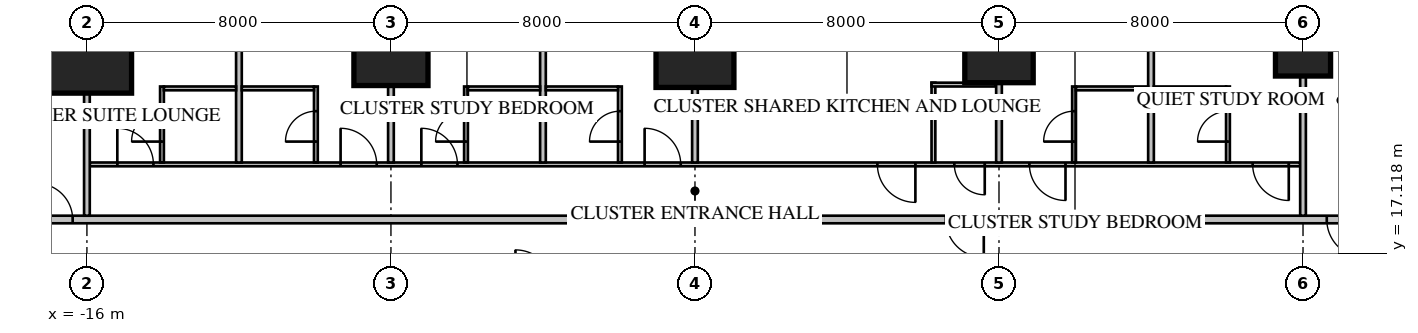
"""IFC4 building model, lengths in metres.
Left out: names, types, materials, properties, quantities, classifications, styles, units other than length and angle.
Written with IfcOpenShell. Run it as: python <this file> out.ifc"""

import sys

from ifc_helpers import new_model, si_unit, direction, frame, frame_2d, origin, origin_2d, place, context, subcontext, project, spatial, rectangle, extrude, element, fill, save


model = new_model("IFC4")
c1 = context("Model", 3, precision=1e-05, world=origin(), true_north=direction((0.0, 1.0)))
c2 = subcontext(c1, "Body", "Model", "MODEL_VIEW")
j1 = project(units=[si_unit("LENGTHUNIT", "METRE"), si_unit("PLANEANGLEUNIT", "RADIAN")], contexts=[c1])
p1 = place(None, origin())
s1 = spatial("IfcSite", under=j1, at=p1, CompositionType="ELEMENT")
p2 = place(p1, origin())
s2 = spatial("IfcBuilding", under=s1, at=p2, CompositionType="ELEMENT")
p3 = place(p2, frame((0.0, 0.0, 39.1)))
s3 = spatial("IfcBuildingStorey", under=s2, at=p3, CompositionType="ELEMENT", Elevation=39.1)
p4 = place(p3, frame((16.0, 22.5, 0.0), z_axis=(0.0, 0.0, 1.0), x_axis=(1.0, 0.0, 0.0)))
e1 = element("IfcColumn", 1, at=p4, inside=s3, PredefinedType="COLUMN", context=c2, shape_type="SweptSolid", body=[
    extrude(rectangle(XDim=1.45, YDim=1.45, at=origin_2d()), origin(), (0.0, 0.0, 1.0), 3.85),
])
p5 = place(p3, frame((8.0, 22.5, 0.0), z_axis=(0.0, 0.0, 1.0), x_axis=(1.0, 0.0, 0.0)))
e2 = element("IfcColumn", 2, at=p5, inside=s3, PredefinedType="COLUMN", context=c2, shape_type="SweptSolid", body=[
    extrude(rectangle(XDim=1.8, YDim=1.8, at=origin_2d()), origin(), (0.0, 0.0, 1.0), 3.85),
])
p6 = place(p3, frame((0.0, 22.5, 0.0), z_axis=(0.0, 0.0, 1.0), x_axis=(1.0, 0.0, 0.0)))
e3 = element("IfcColumn", 3, at=p6, inside=s3, PredefinedType="COLUMN", context=c2, shape_type="SweptSolid", body=[
    extrude(rectangle(XDim=2.05, YDim=2.05, at=origin_2d()), origin(), (0.0, 0.0, 1.0), 3.85),
])
p7 = place(p3, frame((-8.0, 22.5, 0.0), z_axis=(0.0, 0.0, 1.0), x_axis=(1.0, 0.0, 0.0)))
e4 = element("IfcColumn", 4, at=p7, inside=s3, PredefinedType="COLUMN", context=c2, shape_type="SweptSolid", body=[
    extrude(rectangle(XDim=1.95, YDim=1.95, at=origin_2d()), origin(), (0.0, 0.0, 1.0), 3.85),
])
p8 = place(p3, frame((-16.0, 22.5, 0.0), z_axis=(0.0, 0.0, 1.0), x_axis=(1.0, 0.0, 0.0)))
e5 = element("IfcColumn", 5, at=p8, inside=s3, PredefinedType="COLUMN", context=c2, shape_type="SweptSolid", body=[
    extrude(rectangle(XDim=2.35, YDim=2.35, at=origin_2d()), origin(), (0.0, 0.0, 1.0), 3.85),
])
p9 = place(p3, frame((18.0, 18.0, 0.0), z_axis=(0.0, 0.0, 1.0), x_axis=(-1.0, 0.0, 0.0)))
e6 = element("IfcWall", 6, at=p9, inside=s3, PredefinedType="PARTITIONING", context=c2, shape_type="SweptSolid", body=[
    extrude(rectangle(XDim=36.0, YDim=0.2, at=frame_2d((18.0, 0.0))), origin(), (0.0, 0.0, 1.0), 3.65),
])
p10 = place(p9, frame((10.4, 0.0, 0.0)))
e7 = element("IfcOpeningElement", 7, at=p10, cuts=e6, PredefinedType="OPENING", context=c2, shape_type="SweptSolid", body=[
    extrude(rectangle(XDim=1.0, YDim=2.1, at=frame_2d((0.5, 1.05))), frame((0.0, 0.12, 0.0), z_axis=(0.0, -1.0, 0.0), x_axis=(1.0, 0.0, 0.0)), (0.0, 0.0, 1.0), 0.24),
])
p11 = place(p9, frame((0.375, 0.0, 0.0)))
e8 = element("IfcOpeningElement", 8, at=p11, cuts=e6, PredefinedType="OPENING", context=c2, shape_type="SweptSolid", body=[
    extrude(rectangle(XDim=1.0, YDim=2.1, at=frame_2d((0.5, 1.05))), frame((0.0, 0.12, 0.0), z_axis=(0.0, -1.0, 0.0), x_axis=(1.0, 0.0, 0.0)), (0.0, 0.0, 1.0), 0.24),
])
p12 = place(p9, frame((34.375, 0.0, 0.0)))
e9 = element("IfcOpeningElement", 9, at=p12, cuts=e6, PredefinedType="OPENING", context=c2, shape_type="SweptSolid", body=[
    extrude(rectangle(XDim=0.95, YDim=2.1, at=frame_2d((0.475, 1.05))), frame((0.0, 0.12, 0.0), z_axis=(0.0, -1.0, 0.0), x_axis=(1.0, 0.0, 0.0)), (0.0, 0.0, 1.0), 0.24),
])
p13 = place(p3, frame((15.925, 19.45, 0.0), z_axis=(0.0, 0.0, 1.0), x_axis=(-1.0, 0.0, 0.0)))
e10 = element("IfcWall", 10, at=p13, inside=s3, PredefinedType="PARTITIONING", context=c2, shape_type="SweptSolid", body=[
    extrude(rectangle(XDim=31.85, YDim=0.1, at=frame_2d((15.925, 0.0))), origin(), (0.0, 0.0, 1.0), 3.65),
])
p14 = place(p13, frame((10.125, 0.0, 0.0)))
e11 = element("IfcOpeningElement", 11, at=p14, cuts=e10, PredefinedType="OPENING", context=c2, shape_type="SweptSolid", body=[
    extrude(rectangle(XDim=1.0, YDim=2.1, at=frame_2d((0.5, 1.05))), frame((0.0, 0.07, 0.0), z_axis=(0.0, -1.0, 0.0), x_axis=(1.0, 0.0, 0.0)), (0.0, 0.0, 1.0), 0.14),
])
p15 = place(p13, frame((8.3, 0.0, 0.0)))
e12 = element("IfcOpeningElement", 12, at=p15, cuts=e10, PredefinedType="OPENING", context=c2, shape_type="SweptSolid", body=[
    extrude(rectangle(XDim=0.8, YDim=2.1, at=frame_2d((0.4, 1.05))), frame((0.0, 0.07, 0.0), z_axis=(0.0, -1.0, 0.0), x_axis=(1.0, 0.0, 0.0)), (0.0, 0.0, 1.0), 0.14),
])
p16 = place(p13, frame((0.3, 0.0, 0.0)))
e13 = element("IfcOpeningElement", 13, at=p16, cuts=e10, PredefinedType="OPENING", context=c2, shape_type="SweptSolid", body=[
    extrude(rectangle(XDim=0.95, YDim=2.1, at=frame_2d((0.475, 1.05))), frame((0.0, 0.07, 0.0), z_axis=(0.0, -1.0, 0.0), x_axis=(1.0, 0.0, 0.0)), (0.0, 0.0, 1.0), 0.14),
])
p17 = place(p13, frame((6.175, 0.0, 0.0)))
e14 = element("IfcOpeningElement", 14, at=p17, cuts=e10, PredefinedType="OPENING", context=c2, shape_type="SweptSolid", body=[
    extrude(rectangle(XDim=0.95, YDim=2.1, at=frame_2d((0.475, 1.05))), frame((0.0, 0.07, 0.0), z_axis=(0.0, -1.0, 0.0), x_axis=(1.0, 0.0, 0.0)), (0.0, 0.0, 1.0), 0.14),
])
p18 = place(p13, frame((16.3, 0.0, 0.0)))
e15 = element("IfcOpeningElement", 15, at=p18, cuts=e10, PredefinedType="OPENING", context=c2, shape_type="SweptSolid", body=[
    extrude(rectangle(XDim=0.95, YDim=2.1, at=frame_2d((0.475, 1.05))), frame((0.0, 0.07, 0.0), z_axis=(0.0, -1.0, 0.0), x_axis=(1.0, 0.0, 0.0)), (0.0, 0.0, 1.0), 0.14),
])
p19 = place(p13, frame((22.175, 0.0, 0.0)))
e16 = element("IfcOpeningElement", 16, at=p19, cuts=e10, PredefinedType="OPENING", context=c2, shape_type="SweptSolid", body=[
    extrude(rectangle(XDim=0.95, YDim=2.1, at=frame_2d((0.475, 1.05))), frame((0.0, 0.07, 0.0), z_axis=(0.0, -1.0, 0.0), x_axis=(1.0, 0.0, 0.0)), (0.0, 0.0, 1.0), 0.14),
])
p20 = place(p13, frame((24.3, 0.0, 0.0)))
e17 = element("IfcOpeningElement", 17, at=p20, cuts=e10, PredefinedType="OPENING", context=c2, shape_type="SweptSolid", body=[
    extrude(rectangle(XDim=0.95, YDim=2.1, at=frame_2d((0.475, 1.05))), frame((0.0, 0.07, 0.0), z_axis=(0.0, -1.0, 0.0), x_axis=(1.0, 0.0, 0.0)), (0.0, 0.0, 1.0), 0.14),
])
p21 = place(p13, frame((30.175, 0.0, 0.0)))
e18 = element("IfcOpeningElement", 18, at=p21, cuts=e10, PredefinedType="OPENING", context=c2, shape_type="SweptSolid", body=[
    extrude(rectangle(XDim=0.95, YDim=2.1, at=frame_2d((0.475, 1.05))), frame((0.0, 0.07, 0.0), z_axis=(0.0, -1.0, 0.0), x_axis=(1.0, 0.0, 0.0)), (0.0, 0.0, 1.0), 0.14),
])
p22 = place(p3, frame((6.275, 19.5, 0.0), z_axis=(0.0, 0.0, 1.0), x_axis=(0.0, 1.0, 0.0)))
e19 = element("IfcWall", 19, at=p22, inside=s3, PredefinedType="PARTITIONING", context=c2, shape_type="SweptSolid", body=[
    extrude(rectangle(XDim=2.1, YDim=0.1, at=frame_2d((1.05, 0.0))), origin(), (0.0, 0.0, 1.0), 3.65),
])
p23 = place(p3, frame((7.925, 21.55, 0.0), z_axis=(0.0, 0.0, 1.0), x_axis=(-1.0, 0.0, 0.0)))
e20 = element("IfcWall", 20, at=p23, inside=s3, PredefinedType="PARTITIONING", context=c2, shape_type="SweptSolid", body=[
    extrude(rectangle(XDim=1.7, YDim=0.1, at=frame_2d((0.85, 0.0))), origin(), (0.0, 0.0, 1.0), 3.65),
])
p24 = place(p3, frame((16.0, 18.1, 0.0), z_axis=(0.0, 0.0, 1.0), x_axis=(0.0, 1.0, 0.0)))
e21 = element("IfcWall", 21, at=p24, inside=s3, PredefinedType="PARTITIONING", context=c2, shape_type="SweptSolid", body=[
    extrude(rectangle(XDim=6.589, YDim=0.15, at=frame_2d((3.295, 0.0))), origin(), (0.0, 0.0, 1.0), 3.65),
])
for number, where, z_axis, x_axis in (
    (22, (12.0, 19.5, 0.0), (0.0, 0.0, 1.0), (0.0, 1.0, 0.0)),
    (23, (8.0, 19.5, 0.0), (0.0, 0.0, 1.0), (0.0, 1.0, 0.0)),
):
    element("IfcWall", number, at=place(p3, frame(where, z_axis=z_axis, x_axis=x_axis)), inside=s3, PredefinedType="PARTITIONING", context=c2, shape_type="SweptSolid", body=[
        extrude(rectangle(XDim=5.2, YDim=0.15, at=frame_2d((2.6, 0.0))), origin(), (0.0, 0.0, 1.0), 3.65),
    ])
p25 = place(p3, frame((0.0, 19.5, 0.0), z_axis=(0.0, 0.0, 1.0), x_axis=(0.0, 1.0, 0.0)))
e24 = element("IfcWall", 24, at=p25, inside=s3, PredefinedType="PARTITIONING", context=c2, shape_type="SweptSolid", body=[
    extrude(rectangle(XDim=5.2, YDim=0.15, at=frame_2d((2.6, 0.0))), origin(), (0.0, 0.0, 1.0), 2.809),
])
for number, where, z_axis, x_axis in (
    (25, (-4.0, 19.5, 0.0), (0.0, 0.0, 1.0), (0.0, 1.0, 0.0)),
    (26, (-8.0, 19.5, 0.0), (0.0, 0.0, 1.0), (0.0, 1.0, 0.0)),
    (27, (-12.0, 19.5, 0.0), (0.0, 0.0, 1.0), (0.0, 1.0, 0.0)),
):
    element("IfcWall", number, at=place(p3, frame(where, z_axis=z_axis, x_axis=x_axis)), inside=s3, PredefinedType="PARTITIONING", context=c2, shape_type="SweptSolid", body=[
        extrude(rectangle(XDim=5.2, YDim=0.15, at=frame_2d((2.6, 0.0))), origin(), (0.0, 0.0, 1.0), 3.65),
    ])
p26 = place(p3, frame((-16.0, 18.1, 0.0), z_axis=(0.0, 0.0, 1.0), x_axis=(0.0, 1.0, 0.0)))
e28 = element("IfcWall", 28, at=p26, inside=s3, PredefinedType="PARTITIONING", context=c2, shape_type="SweptSolid", body=[
    extrude(rectangle(XDim=6.589, YDim=0.15, at=frame_2d((3.295, 0.0))), origin(), (0.0, 0.0, 1.0), 3.65),
])
p27 = place(p3, frame((14.025, 19.5, 0.0), z_axis=(0.0, 0.0, 1.0), x_axis=(0.0, 1.0, 0.0)))
e29 = element("IfcWall", 29, at=p27, inside=s3, PredefinedType="PARTITIONING", context=c2, shape_type="SweptSolid", body=[
    extrude(rectangle(XDim=2.0, YDim=0.1, at=frame_2d((1.0, 0.0))), origin(), (0.0, 0.0, 1.0), 3.65),
])
p28 = place(p27, frame((0.55, 0.0, 0.0)))
e30 = element("IfcOpeningElement", 30, at=p28, cuts=e29, PredefinedType="OPENING", context=c2, shape_type="SweptSolid", body=[
    extrude(rectangle(XDim=0.8, YDim=2.1, at=frame_2d((0.4, 1.05))), frame((0.0, 0.07, 0.0), z_axis=(0.0, -1.0, 0.0), x_axis=(1.0, 0.0, 0.0)), (0.0, 0.0, 1.0), 0.14),
])
p29 = place(p3, frame((13.975, 21.45, 0.0), z_axis=(0.0, 0.0, 1.0), x_axis=(-1.0, 0.0, 0.0)))
e31 = element("IfcWall", 31, at=p29, inside=s3, PredefinedType="PARTITIONING", context=c2, shape_type="SweptSolid", body=[
    extrude(rectangle(XDim=1.9, YDim=0.1, at=frame_2d((0.95, 0.0))), origin(), (0.0, 0.0, 1.0), 3.65),
])
p30 = place(p3, frame((9.975, 19.5, 0.0), z_axis=(0.0, 0.0, 1.0), x_axis=(0.0, 1.0, 0.0)))
e32 = element("IfcWall", 32, at=p30, inside=s3, PredefinedType="PARTITIONING", context=c2, shape_type="SweptSolid", body=[
    extrude(rectangle(XDim=2.0, YDim=0.1, at=frame_2d((1.0, 0.0))), origin(), (0.0, 0.0, 1.0), 3.65),
])
p31 = place(p30, frame((0.55, 0.0, 0.0)))
e33 = element("IfcOpeningElement", 33, at=p31, cuts=e32, PredefinedType="OPENING", context=c2, shape_type="SweptSolid", body=[
    extrude(rectangle(XDim=0.8, YDim=2.1, at=frame_2d((0.4, 1.05))), frame((0.0, 0.07, 0.0), z_axis=(0.0, -1.0, 0.0), x_axis=(1.0, 0.0, 0.0)), (0.0, 0.0, 1.0), 0.14),
])
p32 = place(p3, frame((11.925, 21.45, 0.0), z_axis=(0.0, 0.0, 1.0), x_axis=(-1.0, 0.0, 0.0)))
e34 = element("IfcWall", 34, at=p32, inside=s3, PredefinedType="PARTITIONING", context=c2, shape_type="SweptSolid", body=[
    extrude(rectangle(XDim=1.9, YDim=0.1, at=frame_2d((0.95, 0.0))), origin(), (0.0, 0.0, 1.0), 3.65),
])
p33 = place(p3, frame((-1.975, 19.5, 0.0), z_axis=(0.0, 0.0, 1.0), x_axis=(0.0, 1.0, 0.0)))
e35 = element("IfcWall", 35, at=p33, inside=s3, PredefinedType="PARTITIONING", context=c2, shape_type="SweptSolid", body=[
    extrude(rectangle(XDim=2.0, YDim=0.1, at=frame_2d((1.0, 0.0))), origin(), (0.0, 0.0, 1.0), 3.65),
])
p34 = place(p33, frame((0.55, 0.0, 0.0)))
e36 = element("IfcOpeningElement", 36, at=p34, cuts=e35, PredefinedType="OPENING", context=c2, shape_type="SweptSolid", body=[
    extrude(rectangle(XDim=0.8, YDim=2.1, at=frame_2d((0.4, 1.05))), frame((0.0, 0.07, 0.0), z_axis=(0.0, -1.0, 0.0), x_axis=(1.0, 0.0, 0.0)), (0.0, 0.0, 1.0), 0.14),
])
p35 = place(p3, frame((-2.025, 21.45, 0.0), z_axis=(0.0, 0.0, 1.0), x_axis=(-1.0, 0.0, 0.0)))
e37 = element("IfcWall", 37, at=p35, inside=s3, PredefinedType="PARTITIONING", context=c2, shape_type="SweptSolid", body=[
    extrude(rectangle(XDim=1.9, YDim=0.1, at=frame_2d((0.95, 0.0))), origin(), (0.0, 0.0, 1.0), 3.65),
])
p36 = place(p3, frame((-6.025, 19.5, 0.0), z_axis=(0.0, 0.0, 1.0), x_axis=(0.0, 1.0, 0.0)))
e38 = element("IfcWall", 38, at=p36, inside=s3, PredefinedType="PARTITIONING", context=c2, shape_type="SweptSolid", body=[
    extrude(rectangle(XDim=2.0, YDim=0.1, at=frame_2d((1.0, 0.0))), origin(), (0.0, 0.0, 1.0), 3.65),
])
p37 = place(p36, frame((0.55, 0.0, 0.0)))
e39 = element("IfcOpeningElement", 39, at=p37, cuts=e38, PredefinedType="OPENING", context=c2, shape_type="SweptSolid", body=[
    extrude(rectangle(XDim=0.8, YDim=2.1, at=frame_2d((0.4, 1.05))), frame((0.0, 0.07, 0.0), z_axis=(0.0, -1.0, 0.0), x_axis=(1.0, 0.0, 0.0)), (0.0, 0.0, 1.0), 0.14),
])
p38 = place(p3, frame((-4.075, 21.45, 0.0), z_axis=(0.0, 0.0, 1.0), x_axis=(-1.0, 0.0, 0.0)))
e40 = element("IfcWall", 40, at=p38, inside=s3, PredefinedType="PARTITIONING", context=c2, shape_type="SweptSolid", body=[
    extrude(rectangle(XDim=1.9, YDim=0.1, at=frame_2d((0.95, 0.0))), origin(), (0.0, 0.0, 1.0), 3.65),
])
p39 = place(p3, frame((-9.975, 19.5, 0.0), z_axis=(0.0, 0.0, 1.0), x_axis=(0.0, 1.0, 0.0)))
e41 = element("IfcWall", 41, at=p39, inside=s3, PredefinedType="PARTITIONING", context=c2, shape_type="SweptSolid", body=[
    extrude(rectangle(XDim=2.0, YDim=0.1, at=frame_2d((1.0, 0.0))), origin(), (0.0, 0.0, 1.0), 3.65),
])
p40 = place(p39, frame((0.55, 0.0, 0.0)))
e42 = element("IfcOpeningElement", 42, at=p40, cuts=e41, PredefinedType="OPENING", context=c2, shape_type="SweptSolid", body=[
    extrude(rectangle(XDim=0.8, YDim=2.1, at=frame_2d((0.4, 1.05))), frame((0.0, 0.07, 0.0), z_axis=(0.0, -1.0, 0.0), x_axis=(1.0, 0.0, 0.0)), (0.0, 0.0, 1.0), 0.14),
])
p41 = place(p3, frame((-10.025, 21.45, 0.0), z_axis=(0.0, 0.0, 1.0), x_axis=(-1.0, 0.0, 0.0)))
e43 = element("IfcWall", 43, at=p41, inside=s3, PredefinedType="PARTITIONING", context=c2, shape_type="SweptSolid", body=[
    extrude(rectangle(XDim=1.9, YDim=0.1, at=frame_2d((0.95, 0.0))), origin(), (0.0, 0.0, 1.0), 3.65),
])
p42 = place(p3, frame((-14.025, 19.5, 0.0), z_axis=(0.0, 0.0, 1.0), x_axis=(0.0, 1.0, 0.0)))
e44 = element("IfcWall", 44, at=p42, inside=s3, PredefinedType="PARTITIONING", context=c2, shape_type="SweptSolid", body=[
    extrude(rectangle(XDim=2.0, YDim=0.1, at=frame_2d((1.0, 0.0))), origin(), (0.0, 0.0, 1.0), 3.65),
])
p43 = place(p42, frame((0.55, 0.0, 0.0)))
e45 = element("IfcOpeningElement", 45, at=p43, cuts=e44, PredefinedType="OPENING", context=c2, shape_type="SweptSolid", body=[
    extrude(rectangle(XDim=0.8, YDim=2.1, at=frame_2d((0.4, 1.05))), frame((0.0, 0.07, 0.0), z_axis=(0.0, -1.0, 0.0), x_axis=(1.0, 0.0, 0.0)), (0.0, 0.0, 1.0), 0.14),
])
p44 = place(p3, frame((-12.075, 21.45, 0.0), z_axis=(0.0, 0.0, 1.0), x_axis=(-1.0, 0.0, 0.0)))
e46 = element("IfcWall", 46, at=p44, inside=s3, PredefinedType="PARTITIONING", context=c2, shape_type="SweptSolid", body=[
    extrude(rectangle(XDim=1.9, YDim=0.1, at=frame_2d((0.95, 0.0))), origin(), (0.0, 0.0, 1.0), 3.65),
])
p45 = place(p10, origin())
e47 = element("IfcDoor", 47, at=p45, inside=s3, OperationType="SINGLE_SWING_LEFT", PredefinedType="DOOR", context=c2, shape_type="SweptSolid", body=[
    extrude(rectangle(XDim=1.0, YDim=2.1, at=frame_2d((0.5, 1.05))), frame((0.0, 0.025, 0.0), z_axis=(0.0, -1.0, 0.0), x_axis=(1.0, 0.0, 0.0)), (0.0, 0.0, 1.0), 0.05),
])
fill(e7, e47)
p46 = place(p14, origin())
e48 = element("IfcDoor", 48, at=p46, inside=s3, OperationType="SINGLE_SWING_LEFT", PredefinedType="DOOR", context=c2, shape_type="SweptSolid", body=[
    extrude(rectangle(XDim=1.0, YDim=2.1, at=frame_2d((0.5, 1.05))), frame((0.0, 0.025, 0.0), z_axis=(0.0, -1.0, 0.0), x_axis=(1.0, 0.0, 0.0)), (0.0, 0.0, 1.0), 0.05),
])
fill(e11, e48)
p47 = place(p15, origin())
e49 = element("IfcDoor", 49, at=p47, inside=s3, OperationType="SINGLE_SWING_LEFT", PredefinedType="DOOR", context=c2, shape_type="SweptSolid", body=[
    extrude(rectangle(XDim=0.8, YDim=2.1, at=frame_2d((0.4, 1.05))), frame((0.0, 0.025, 0.0), z_axis=(0.0, -1.0, 0.0), x_axis=(1.0, 0.0, 0.0)), (0.0, 0.0, 1.0), 0.05),
])
fill(e12, e49)
p48 = place(p11, origin())
e50 = element("IfcDoor", 50, at=p48, inside=s3, OperationType="SINGLE_SWING_LEFT", PredefinedType="DOOR", context=c2, shape_type="SweptSolid", body=[
    extrude(rectangle(XDim=1.0, YDim=2.1, at=frame_2d((0.5, 1.05))), frame((0.0, 0.025, 0.0), z_axis=(0.0, -1.0, 0.0), x_axis=(1.0, 0.0, 0.0)), (0.0, 0.0, 1.0), 0.05),
])
fill(e8, e50)
p49 = place(p16, origin())
e51 = element("IfcDoor", 51, at=p49, inside=s3, OperationType="SINGLE_SWING_LEFT", PredefinedType="DOOR", context=c2, shape_type="SweptSolid", body=[
    extrude(rectangle(XDim=0.95, YDim=2.1, at=frame_2d((0.475, 1.05))), frame((0.0, 0.025, 0.0), z_axis=(0.0, -1.0, 0.0), x_axis=(1.0, 0.0, 0.0)), (0.0, 0.0, 1.0), 0.05),
])
fill(e13, e51)
p50 = place(p28, origin())
e52 = element("IfcDoor", 52, at=p50, inside=s3, OperationType="SINGLE_SWING_LEFT", PredefinedType="DOOR", context=c2, shape_type="SweptSolid", body=[
    extrude(rectangle(XDim=0.8, YDim=2.1, at=frame_2d((0.4, 1.05))), frame((0.0, 0.025, 0.0), z_axis=(0.0, -1.0, 0.0), x_axis=(1.0, 0.0, 0.0)), (0.0, 0.0, 1.0), 0.05),
])
fill(e30, e52)
p51 = place(p17, origin())
e53 = element("IfcDoor", 53, at=p51, inside=s3, OperationType="SINGLE_SWING_LEFT", PredefinedType="DOOR", context=c2, shape_type="SweptSolid", body=[
    extrude(rectangle(XDim=0.95, YDim=2.1, at=frame_2d((0.475, 1.05))), frame((0.0, 0.025, 0.0), z_axis=(0.0, -1.0, 0.0), x_axis=(1.0, 0.0, 0.0)), (0.0, 0.0, 1.0), 0.05),
])
fill(e14, e53)
p52 = place(p31, origin())
e54 = element("IfcDoor", 54, at=p52, inside=s3, OperationType="SINGLE_SWING_LEFT", PredefinedType="DOOR", context=c2, shape_type="SweptSolid", body=[
    extrude(rectangle(XDim=0.8, YDim=2.1, at=frame_2d((0.4, 1.05))), frame((0.0, 0.025, 0.0), z_axis=(0.0, -1.0, 0.0), x_axis=(1.0, 0.0, 0.0)), (0.0, 0.0, 1.0), 0.05),
])
fill(e33, e54)
p53 = place(p18, origin())
e55 = element("IfcDoor", 55, at=p53, inside=s3, OperationType="SINGLE_SWING_RIGHT", PredefinedType="DOOR", context=c2, shape_type="SweptSolid", body=[
    extrude(rectangle(XDim=0.95, YDim=2.1, at=frame_2d((0.475, 1.05))), frame((0.0, 0.025, 0.0), z_axis=(0.0, -1.0, 0.0), x_axis=(1.0, 0.0, 0.0)), (0.0, 0.0, 1.0), 0.05),
])
fill(e15, e55)
p54 = place(p34, origin())
e56 = element("IfcDoor", 56, at=p54, inside=s3, OperationType="SINGLE_SWING_LEFT", PredefinedType="DOOR", context=c2, shape_type="SweptSolid", body=[
    extrude(rectangle(XDim=0.8, YDim=2.1, at=frame_2d((0.4, 1.05))), frame((0.0, 0.025, 0.0), z_axis=(0.0, -1.0, 0.0), x_axis=(1.0, 0.0, 0.0)), (0.0, 0.0, 1.0), 0.05),
])
fill(e36, e56)
p55 = place(p19, origin())
e57 = element("IfcDoor", 57, at=p55, inside=s3, OperationType="SINGLE_SWING_RIGHT", PredefinedType="DOOR", context=c2, shape_type="SweptSolid", body=[
    extrude(rectangle(XDim=0.95, YDim=2.1, at=frame_2d((0.475, 1.05))), frame((0.0, 0.025, 0.0), z_axis=(0.0, -1.0, 0.0), x_axis=(1.0, 0.0, 0.0)), (0.0, 0.0, 1.0), 0.05),
])
fill(e16, e57)
p56 = place(p37, origin())
e58 = element("IfcDoor", 58, at=p56, inside=s3, OperationType="SINGLE_SWING_LEFT", PredefinedType="DOOR", context=c2, shape_type="SweptSolid", body=[
    extrude(rectangle(XDim=0.8, YDim=2.1, at=frame_2d((0.4, 1.05))), frame((0.0, 0.025, 0.0), z_axis=(0.0, -1.0, 0.0), x_axis=(1.0, 0.0, 0.0)), (0.0, 0.0, 1.0), 0.05),
])
fill(e39, e58)
p57 = place(p20, origin())
e59 = element("IfcDoor", 59, at=p57, inside=s3, OperationType="SINGLE_SWING_RIGHT", PredefinedType="DOOR", context=c2, shape_type="SweptSolid", body=[
    extrude(rectangle(XDim=0.95, YDim=2.1, at=frame_2d((0.475, 1.05))), frame((0.0, 0.025, 0.0), z_axis=(0.0, -1.0, 0.0), x_axis=(1.0, 0.0, 0.0)), (0.0, 0.0, 1.0), 0.05),
])
fill(e17, e59)
p58 = place(p40, origin())
e60 = element("IfcDoor", 60, at=p58, inside=s3, OperationType="SINGLE_SWING_LEFT", PredefinedType="DOOR", context=c2, shape_type="SweptSolid", body=[
    extrude(rectangle(XDim=0.8, YDim=2.1, at=frame_2d((0.4, 1.05))), frame((0.0, 0.025, 0.0), z_axis=(0.0, -1.0, 0.0), x_axis=(1.0, 0.0, 0.0)), (0.0, 0.0, 1.0), 0.05),
])
fill(e42, e60)
p59 = place(p21, origin())
e61 = element("IfcDoor", 61, at=p59, inside=s3, OperationType="SINGLE_SWING_RIGHT", PredefinedType="DOOR", context=c2, shape_type="SweptSolid", body=[
    extrude(rectangle(XDim=0.95, YDim=2.1, at=frame_2d((0.475, 1.05))), frame((0.0, 0.025, 0.0), z_axis=(0.0, -1.0, 0.0), x_axis=(1.0, 0.0, 0.0)), (0.0, 0.0, 1.0), 0.05),
])
fill(e18, e61)
p60 = place(p43, origin())
e62 = element("IfcDoor", 62, at=p60, inside=s3, OperationType="SINGLE_SWING_LEFT", PredefinedType="DOOR", context=c2, shape_type="SweptSolid", body=[
    extrude(rectangle(XDim=0.8, YDim=2.1, at=frame_2d((0.4, 1.05))), frame((0.0, 0.025, 0.0), z_axis=(0.0, -1.0, 0.0), x_axis=(1.0, 0.0, 0.0)), (0.0, 0.0, 1.0), 0.05),
])
fill(e45, e62)
p61 = place(p12, origin())
e63 = element("IfcDoor", 63, at=p61, inside=s3, OperationType="SINGLE_SWING_RIGHT", PredefinedType="DOOR", context=c2, shape_type="SweptSolid", body=[
    extrude(rectangle(XDim=0.95, YDim=2.1, at=frame_2d((0.475, 1.05))), frame((0.0, 0.025, 0.0), z_axis=(0.0, -1.0, 0.0), x_axis=(1.0, 0.0, 0.0)), (0.0, 0.0, 1.0), 0.05),
])
fill(e9, e63)
save(model, sys.argv[1])
